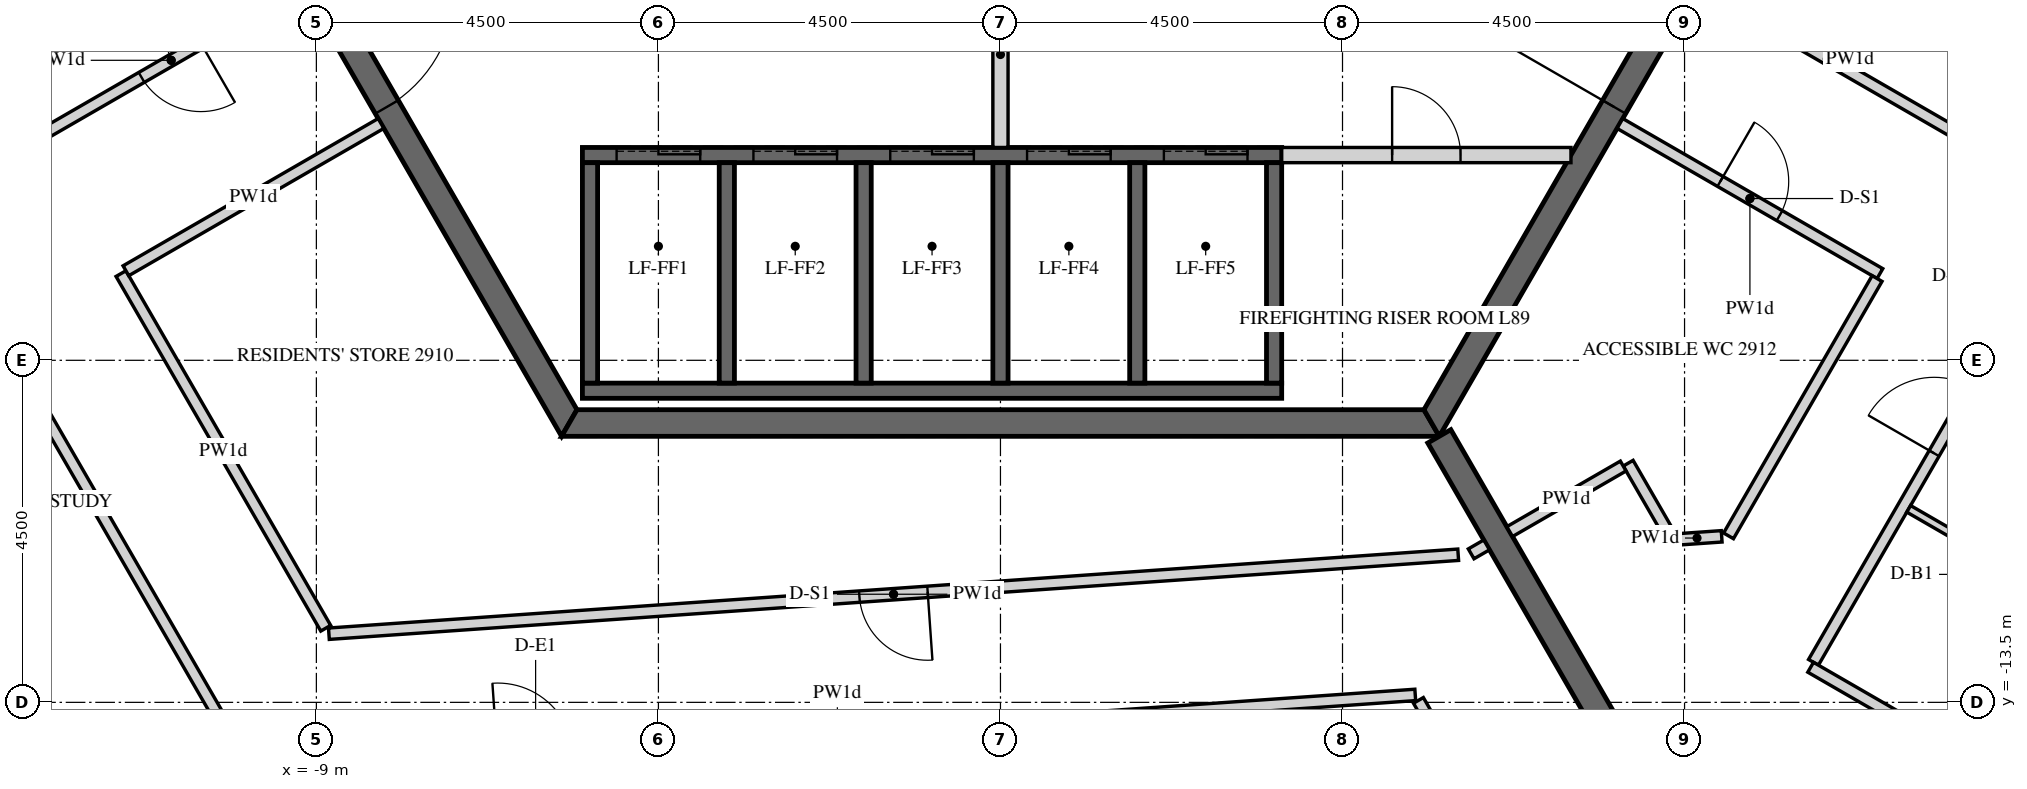
"""IFC4 building model, lengths in metres.
Left out: names, types, materials, properties, quantities, classifications, styles, units other than length and angle.
Written with IfcOpenShell. Run it as: python <this file> out.ifc"""

import sys

from ifc_helpers import new_model, si_unit, direction, frame, frame_2d, origin, place, context, subcontext, project, spatial, polyline, rectangle, outline, extrude, element, fill, save


model = new_model("IFC4")
c1 = context("Model", 3, precision=1e-05, world=origin(), true_north=direction((0.0, 1.0)))
c2 = subcontext(c1, "Body", "Model", "MODEL_VIEW")
j1 = project(units=[si_unit("LENGTHUNIT", "METRE"), si_unit("PLANEANGLEUNIT", "RADIAN")], contexts=[c1])
p1 = place(None, origin())
s1 = spatial("IfcSite", under=j1, at=p1, CompositionType="ELEMENT")
p2 = place(p1, origin())
s2 = spatial("IfcBuilding", under=s1, at=p2, CompositionType="ELEMENT")
p3 = place(p2, frame((0.0, 0.0, 369.0)))
s3 = spatial("IfcBuildingStorey", under=s2, at=p3, CompositionType="ELEMENT", Elevation=369.0)
p4 = place(p3, frame((-11.345, 0.0, -0.15), z_axis=(0.0, 0.0, 1.0), x_axis=(0.499995046907, -0.866028263435, 0.0)))
e1 = element("IfcWall", 1, at=p4, inside=s3, PredefinedType="SHEAR", context=c2, shape_type="SweptSolid", body=[
    extrude(outline(polyline([(-0.101, -0.175), (11.446, -0.175), (11.244, 0.175), (0.101, 0.175), (-0.101, -0.175)])), origin(), (0.0, 0.0, 1.0), 3.9),
])
p5 = place(p4, frame((4.744, 0.0, 0.15)))
e2 = element("IfcOpeningElement", 2, at=p5, cuts=e1, PredefinedType="OPENING", context=c2, shape_type="SweptSolid", body=[
    extrude(rectangle(XDim=1.8, YDim=2.4, at=frame_2d((0.9, 1.2))), frame((0.0, 0.185, 0.0), z_axis=(0.0, -1.0, 0.0), x_axis=(1.0, 0.0, 0.0)), (0.0, 0.0, 1.0), 0.37),
])
p6 = place(p3, frame((-5.673, -9.825, -0.15), z_axis=(0.0, 0.0, 1.0), x_axis=(1.0, 0.0, 0.0)))
e3 = element("IfcWall", 3, at=p6, inside=s3, PredefinedType="SHEAR", context=c2, shape_type="SweptSolid", body=[
    extrude(outline(polyline([(-0.101, -0.175), (11.446, -0.175), (11.244, 0.175), (0.101, 0.175), (-0.101, -0.175)])), origin(), (0.0, 0.0, 1.0), 3.9),
])
p7 = place(p3, frame((5.673, -9.825, -0.15), z_axis=(0.0, 0.0, 1.0), x_axis=(0.499995046907, 0.866028263435, 0.0)))
e4 = element("IfcWall", 4, at=p7, inside=s3, PredefinedType="SHEAR", context=c2, shape_type="SweptSolid", body=[
    extrude(outline(polyline([(-0.101, -0.175), (11.446, -0.175), (11.244, 0.175), (0.101, 0.175), (-0.101, -0.175)])), origin(), (0.0, 0.0, 1.0), 3.9),
])
p8 = place(p7, frame((4.801, 0.0, 0.15)))
e5 = element("IfcOpeningElement", 5, at=p8, cuts=e4, PredefinedType="OPENING", context=c2, shape_type="SweptSolid", body=[
    extrude(rectangle(XDim=1.8, YDim=2.4, at=frame_2d((0.9, 1.2))), frame((0.0, 0.185, 0.0), z_axis=(0.0, -1.0, 0.0), x_axis=(1.0, 0.0, 0.0)), (0.0, 0.0, 1.0), 0.37),
])
p9 = place(p3, frame((5.773, -10.0, -0.15), z_axis=(0.0, 0.0, 1.0), x_axis=(0.500007911273, -0.866020836161, 0.0)))
e6 = element("IfcWall", 6, at=p9, inside=s3, PredefinedType="SHEAR", context=c2, shape_type="SweptSolid", body=[
    extrude(rectangle(XDim=14.51, YDim=0.35, at=frame_2d((7.255, 0.0))), origin(), (0.0, 0.0, 1.0), 3.9),
])
p10 = place(p9, frame((6.355, 0.0, 0.15)))
e7 = element("IfcOpeningElement", 7, at=p10, cuts=e6, PredefinedType="OPENING", context=c2, shape_type="SweptSolid", body=[
    extrude(rectangle(XDim=1.8, YDim=2.4, at=frame_2d((0.9, 1.2))), frame((0.0, 0.185, 0.0), z_axis=(0.0, -1.0, 0.0), x_axis=(1.0, 0.0, 0.0)), (0.0, 0.0, 1.0), 0.37),
])
p11 = place(p3, frame((-5.5, -6.3, -0.25), z_axis=(0.0, 0.0, 1.0), x_axis=(1.0, 0.0, 0.0)))
e8 = element("IfcWall", 8, at=p11, inside=s3, PredefinedType="SHEAR", context=c2, shape_type="SweptSolid", body=[
    extrude(rectangle(XDim=9.2, YDim=0.2, at=frame_2d((4.6, 0.0))), origin(), (0.0, 0.0, 1.0), 3.9),
])
p12 = place(p11, frame((0.45, 0.0, 0.25)))
e9 = element("IfcOpeningElement", 9, at=p12, cuts=e8, PredefinedType="OPENING", context=c2, shape_type="SweptSolid", body=[
    extrude(rectangle(XDim=1.1, YDim=2.1, at=frame_2d((0.55, 1.05))), frame((0.0, 0.11, 0.0), z_axis=(0.0, -1.0, 0.0), x_axis=(1.0, 0.0, 0.0)), (0.0, 0.0, 1.0), 0.22),
])
p13 = place(p11, frame((2.25, 0.0, 0.25)))
e10 = element("IfcOpeningElement", 10, at=p13, cuts=e8, PredefinedType="OPENING", context=c2, shape_type="SweptSolid", body=[
    extrude(rectangle(XDim=1.1, YDim=2.1, at=frame_2d((0.55, 1.05))), frame((0.0, 0.11, 0.0), z_axis=(0.0, -1.0, 0.0), x_axis=(1.0, 0.0, 0.0)), (0.0, 0.0, 1.0), 0.22),
])
p14 = place(p11, frame((4.05, 0.0, 0.25)))
e11 = element("IfcOpeningElement", 11, at=p14, cuts=e8, PredefinedType="OPENING", context=c2, shape_type="SweptSolid", body=[
    extrude(rectangle(XDim=1.1, YDim=2.1, at=frame_2d((0.55, 1.05))), frame((0.0, 0.11, 0.0), z_axis=(0.0, -1.0, 0.0), x_axis=(1.0, 0.0, 0.0)), (0.0, 0.0, 1.0), 0.22),
])
p15 = place(p11, frame((5.85, 0.0, 0.25)))
e12 = element("IfcOpeningElement", 12, at=p15, cuts=e8, PredefinedType="OPENING", context=c2, shape_type="SweptSolid", body=[
    extrude(rectangle(XDim=1.1, YDim=2.1, at=frame_2d((0.55, 1.05))), frame((0.0, 0.11, 0.0), z_axis=(0.0, -1.0, 0.0), x_axis=(1.0, 0.0, 0.0)), (0.0, 0.0, 1.0), 0.22),
])
p16 = place(p11, frame((7.65, 0.0, 0.25)))
e13 = element("IfcOpeningElement", 13, at=p16, cuts=e8, PredefinedType="OPENING", context=c2, shape_type="SweptSolid", body=[
    extrude(rectangle(XDim=1.1, YDim=2.1, at=frame_2d((0.55, 1.05))), frame((0.0, 0.11, 0.0), z_axis=(0.0, -1.0, 0.0), x_axis=(1.0, 0.0, 0.0)), (0.0, 0.0, 1.0), 0.22),
])
p17 = place(p3, frame((-5.5, -9.4, -0.25), z_axis=(0.0, 0.0, 1.0), x_axis=(1.0, 0.0, 0.0)))
e14 = element("IfcWall", 14, at=p17, inside=s3, PredefinedType="SHEAR", context=c2, shape_type="SweptSolid", body=[
    extrude(rectangle(XDim=9.2, YDim=0.2, at=frame_2d((4.6, 0.0))), origin(), (0.0, 0.0, 1.0), 3.9),
])
for number, where, z_axis, x_axis in (
    (15, (-5.4, -9.3, -0.25), (0.0, 0.0, 1.0), (0.0, 1.0, 0.0)),
    (16, (-3.6, -9.3, -0.25), (0.0, 0.0, 1.0), (0.0, 1.0, 0.0)),
    (17, (-1.8, -9.3, -0.25), (0.0, 0.0, 1.0), (0.0, 1.0, 0.0)),
    (18, (0.0, -9.3, -0.25), (0.0, 0.0, 1.0), (0.0, 1.0, 0.0)),
    (19, (1.8, -9.3, -0.25), (0.0, 0.0, 1.0), (0.0, 1.0, 0.0)),
    (20, (3.6, -9.3, -0.25), (0.0, 0.0, 1.0), (0.0, 1.0, 0.0)),
):
    element("IfcWall", number, at=place(p3, frame(where, z_axis=z_axis, x_axis=x_axis)), inside=s3, PredefinedType="SHEAR", context=c2, shape_type="SweptSolid", body=[
        extrude(rectangle(XDim=2.9, YDim=0.2, at=frame_2d((1.45, 0.0))), origin(), (0.0, 0.0, 1.0), 3.9),
    ])
p18 = place(p3, frame((0.0, -6.2, 0.0), z_axis=(0.0, 0.0, 1.0), x_axis=(0.0, 1.0, 0.0)))
e21 = element("IfcWall", 21, at=p18, inside=s3, PredefinedType="PARTITIONING", context=c2, shape_type="SweptSolid", body=[
    extrude(rectangle(XDim=6.1, YDim=0.2, at=frame_2d((3.05, 0.0))), origin(), (0.0, 0.0, 1.0), 3.65),
])
p19 = place(p3, frame((3.7, -6.3, 0.0), z_axis=(0.0, 0.0, 1.0), x_axis=(1.0, 0.0, 0.0)))
e22 = element("IfcWall", 22, at=p19, inside=s3, PredefinedType="PARTITIONING", context=c2, shape_type="SweptSolid", body=[
    extrude(rectangle(XDim=3.806, YDim=0.2, at=frame_2d((1.903, 0.0))), origin(), (0.0, 0.0, 1.0), 3.65),
])
p20 = place(p19, frame((1.453, 0.0, 0.0)))
e23 = element("IfcOpeningElement", 23, at=p20, cuts=e22, PredefinedType="OPENING", context=c2, shape_type="SweptSolid", body=[
    extrude(rectangle(XDim=0.9, YDim=2.1, at=frame_2d((0.45, 1.05))), frame((0.0, 0.11, 0.0), z_axis=(0.0, -1.0, 0.0), x_axis=(1.0, 0.0, 0.0)), (0.0, 0.0, 1.0), 0.22),
])
p21 = place(p3, frame((-16.583, -2.777, 0.0), z_axis=(0.0, 0.0, 1.0), x_axis=(0.50000467473, -0.866022704811, 0.0)))
e24 = element("IfcWall", 24, at=p21, inside=s3, PredefinedType="PARTITIONING", context=c2, shape_type="SweptSolid", body=[
    extrude(rectangle(XDim=13.504, YDim=0.15, at=frame_2d((6.752, 0.0))), origin(), (0.0, 0.0, 1.0), 2.47),
])
p22 = place(p21, frame((0.925, 0.0, 0.0)))
e25 = element("IfcOpeningElement", 25, at=p22, cuts=e24, PredefinedType="OPENING", context=c2, shape_type="SweptSolid", body=[
    extrude(rectangle(XDim=1.0, YDim=2.1, at=frame_2d((0.5, 1.05))), frame((0.0, 0.085, 0.0), z_axis=(0.0, -1.0, 0.0), x_axis=(1.0, 0.0, 0.0)), (0.0, 0.0, 1.0), 0.17),
])
p23 = place(p3, frame((-9.749, -14.465, 0.0), z_axis=(0.0, 0.0, 1.0), x_axis=(0.997564252773, 0.069753577612, 0.0)))
e26 = element("IfcWall", 26, at=p23, inside=s3, PredefinedType="PARTITIONING", context=c2, shape_type="SweptSolid", body=[
    extrude(rectangle(XDim=15.243, YDim=0.15, at=frame_2d((7.621, 0.0))), origin(), (0.0, 0.0, 1.0), 2.47),
])
p24 = place(p23, frame((3.142, 0.0, 0.0)))
e27 = element("IfcOpeningElement", 27, at=p24, cuts=e26, PredefinedType="OPENING", context=c2, shape_type="SweptSolid", body=[
    extrude(rectangle(XDim=1.0, YDim=2.1, at=frame_2d((0.5, 1.05))), frame((0.0, 0.085, 0.0), z_axis=(0.0, -1.0, 0.0), x_axis=(1.0, 0.0, 0.0)), (0.0, 0.0, 1.0), 0.17),
])
p25 = place(p3, frame((5.499, -13.474, 0.0), z_axis=(0.0, 0.0, 1.0), x_axis=(0.500002592159, -0.866023907196, 0.0)))
e28 = element("IfcWall", 28, at=p25, inside=s3, PredefinedType="PARTITIONING", context=c2, shape_type="SweptSolid", body=[
    extrude(rectangle(XDim=5.784, YDim=0.15, at=frame_2d((2.892, 0.0))), origin(), (0.0, 0.0, 1.0), 2.47),
])
p26 = place(p3, frame((-9.2, -4.066, 0.0), z_axis=(0.0, 0.0, 1.0), x_axis=(-0.866020906874, -0.500007788796, 0.0)))
e29 = element("IfcWall", 29, at=p26, inside=s3, PredefinedType="PARTITIONING", context=c2, shape_type="SweptSolid", body=[
    extrude(rectangle(XDim=3.95, YDim=0.15, at=frame_2d((1.975, 0.0))), origin(), (0.0, 0.0, 1.0), 2.47),
])
p27 = place(p26, frame((1.525, 0.0, 0.0)))
e30 = element("IfcOpeningElement", 30, at=p27, cuts=e29, PredefinedType="OPENING", context=c2, shape_type="SweptSolid", body=[
    extrude(rectangle(XDim=0.9, YDim=2.1, at=frame_2d((0.45, 1.05))), frame((0.0, 0.085, 0.0), z_axis=(0.0, -1.0, 0.0), x_axis=(1.0, 0.0, 0.0)), (0.0, 0.0, 1.0), 0.17),
])
p28 = place(p3, frame((6.396, -11.429, 0.0), z_axis=(0.0, 0.0, 1.0), x_axis=(-0.866254745882, -0.499602557277, 0.0)))
e31 = element("IfcWall", 31, at=p28, inside=s3, PredefinedType="PARTITIONING", context=c2, shape_type="SweptSolid", body=[
    extrude(rectangle(XDim=0.235, YDim=0.15, at=frame_2d((0.118, 0.0))), origin(), (0.0, 0.0, 1.0), 2.47),
])
p29 = place(p3, frame((6.022, -11.558, 0.0), z_axis=(0.0, 0.0, 1.0), x_axis=(-0.997564502115, -0.06975001161, 0.0)))
e32 = element("IfcWall", 32, at=p29, inside=s3, PredefinedType="PARTITIONING", context=c2, shape_type="SweptSolid", body=[
    extrude(rectangle(XDim=14.894, YDim=0.15, at=frame_2d((7.447, 0.0))), origin(), (0.0, 0.0, 1.0), 2.47),
])
p30 = place(p29, frame((6.997, 0.0, 0.0)))
e33 = element("IfcOpeningElement", 33, at=p30, cuts=e32, PredefinedType="OPENING", context=c2, shape_type="SweptSolid", body=[
    extrude(rectangle(XDim=0.9, YDim=2.1, at=frame_2d((0.45, 1.05))), frame((0.0, 0.085, 0.0), z_axis=(0.0, -1.0, 0.0), x_axis=(1.0, 0.0, 0.0)), (0.0, 0.0, 1.0), 0.17),
])
p31 = place(p3, frame((-8.877, -12.525, 0.0), z_axis=(0.0, 0.0, 1.0), x_axis=(-0.500014061761, 0.866017285071, 0.0)))
e34 = element("IfcWall", 34, at=p31, inside=s3, PredefinedType="PARTITIONING", context=c2, shape_type="SweptSolid", body=[
    extrude(rectangle(XDim=5.387, YDim=0.15, at=frame_2d((2.693, 0.0))), origin(), (0.0, 0.0, 1.0), 2.47),
])
p32 = place(p3, frame((-11.506, -7.822, 0.0), z_axis=(0.0, 0.0, 1.0), x_axis=(0.866032409438, 0.499987865656, 0.0)))
e35 = element("IfcWall", 35, at=p32, inside=s3, PredefinedType="PARTITIONING", context=c2, shape_type="SweptSolid", body=[
    extrude(rectangle(XDim=3.875, YDim=0.15, at=frame_2d((1.938, 0.0))), origin(), (0.0, 0.0, 1.0), 2.47),
])
p33 = place(p3, frame((10.697, -12.973, 0.0), z_axis=(0.0, 0.0, 1.0), x_axis=(0.499991115059, 0.866030533446, 0.0)))
e36 = element("IfcWall", 36, at=p33, inside=s3, PredefinedType="PARTITIONING", context=c2, shape_type="SweptSolid", body=[
    extrude(rectangle(XDim=13.504, YDim=0.15, at=frame_2d((6.752, 0.0))), origin(), (0.0, 0.0, 1.0), 2.47),
])
p34 = place(p33, frame((3.175, 0.0, 0.0)))
e37 = element("IfcOpeningElement", 37, at=p34, cuts=e36, PredefinedType="OPENING", context=c2, shape_type="SweptSolid", body=[
    extrude(rectangle(XDim=1.0, YDim=2.1, at=frame_2d((0.5, 1.05))), frame((0.0, 0.085, 0.0), z_axis=(0.0, -1.0, 0.0), x_axis=(1.0, 0.0, 0.0)), (0.0, 0.0, 1.0), 0.17),
])
p35 = place(p3, frame((13.777, -14.838, 0.0), z_axis=(0.0, 0.0, 1.0), x_axis=(-0.866047807691, 0.499961193289, 0.0)))
e38 = element("IfcWall", 38, at=p35, inside=s3, PredefinedType="PARTITIONING", context=c2, shape_type="SweptSolid", body=[
    extrude(rectangle(XDim=3.6, YDim=0.15, at=frame_2d((1.8, 0.0))), origin(), (0.0, 0.0, 1.0), 2.47),
])
p36 = place(p3, frame((12.555, -6.003, 0.0), z_axis=(0.0, 0.0, 1.0), x_axis=(-0.866016658288, 0.500015147339, 0.0)))
e39 = element("IfcWall", 39, at=p36, inside=s3, PredefinedType="PARTITIONING", context=c2, shape_type="SweptSolid", body=[
    extrude(rectangle(XDim=3.875, YDim=0.15, at=frame_2d((1.938, 0.0))), origin(), (0.0, 0.0, 1.0), 2.47),
])
p37 = place(p3, frame((8.15, -5.884, 0.0), z_axis=(0.0, 0.0, 1.0), x_axis=(0.866020906874, -0.500007788796, 0.0)))
e40 = element("IfcWall", 40, at=p37, inside=s3, PredefinedType="PARTITIONING", context=c2, shape_type="SweptSolid", body=[
    extrude(rectangle(XDim=3.95, YDim=0.15, at=frame_2d((1.975, 0.0))), origin(), (0.0, 0.0, 1.0), 2.47),
])
p38 = place(p37, frame((1.525, 0.0, 0.0)))
e41 = element("IfcOpeningElement", 41, at=p38, cuts=e40, PredefinedType="OPENING", context=c2, shape_type="SweptSolid", body=[
    extrude(rectangle(XDim=0.9, YDim=2.1, at=frame_2d((0.45, 1.05))), frame((0.0, 0.085, 0.0), z_axis=(0.0, -1.0, 0.0), x_axis=(1.0, 0.0, 0.0)), (0.0, 0.0, 1.0), 0.17),
])
p39 = place(p3, frame((11.533, -7.924, 0.0), z_axis=(0.0, 0.0, 1.0), x_axis=(-0.500001804394, -0.866024362014, 0.0)))
e42 = element("IfcWall", 42, at=p39, inside=s3, PredefinedType="PARTITIONING", context=c2, shape_type="SweptSolid", body=[
    extrude(rectangle(XDim=3.909, YDim=0.15, at=frame_2d((1.954, 0.0))), origin(), (0.0, 0.0, 1.0), 2.47),
])
p40 = place(p3, frame((9.488, -11.316, 0.0), z_axis=(0.0, 0.0, 1.0), x_axis=(-0.997556873667, -0.06985902805, 0.0)))
e43 = element("IfcWall", 43, at=p40, inside=s3, PredefinedType="PARTITIONING", context=c2, shape_type="SweptSolid", body=[
    extrude(rectangle(XDim=0.65, YDim=0.15, at=frame_2d((0.325, 0.0))), origin(), (0.0, 0.0, 1.0), 2.47),
])
p41 = place(p3, frame((8.798, -11.289, 0.0), z_axis=(0.0, 0.0, 1.0), x_axis=(-0.499859449273, 0.866106535579, 0.0)))
e44 = element("IfcWall", 44, at=p41, inside=s3, PredefinedType="PARTITIONING", context=c2, shape_type="SweptSolid", body=[
    extrude(rectangle(XDim=1.08, YDim=0.15, at=frame_2d((0.54, 0.0))), origin(), (0.0, 0.0, 1.0), 2.47),
])
p42 = place(p3, frame((8.193, -10.391, 0.0), z_axis=(0.0, 0.0, 1.0), x_axis=(-0.866013532718, -0.500020560727, 0.0)))
e45 = element("IfcWall", 45, at=p42, inside=s3, PredefinedType="PARTITIONING", context=c2, shape_type="SweptSolid", body=[
    extrude(rectangle(XDim=1.725, YDim=0.15, at=frame_2d((0.863, 0.0))), origin(), (0.0, 0.0, 1.0), 2.47),
])
p43 = place(p3, frame((11.949, -10.954, 0.0), z_axis=(0.0, 0.0, 1.0), x_axis=(0.866001044215, -0.500042189638, 0.0)))
e46 = element("IfcWall", 46, at=p43, inside=s3, PredefinedType="PARTITIONING", context=c2, shape_type="SweptSolid", body=[
    extrude(rectangle(XDim=3.525, YDim=0.1, at=frame_2d((1.763, 0.0))), origin(), (0.0, 0.0, 1.0), 2.47),
])
p44 = place(p43, frame((1.325, 0.0, 0.0)))
e47 = element("IfcOpeningElement", 47, at=p44, cuts=e46, PredefinedType="OPENING", context=c2, shape_type="SweptSolid", body=[
    extrude(rectangle(XDim=0.8, YDim=2.1, at=frame_2d((0.4, 1.05))), frame((0.0, 0.06, 0.0), z_axis=(0.0, -1.0, 0.0), x_axis=(1.0, 0.0, 0.0)), (0.0, 0.0, 1.0), 0.12),
])
p45 = place(p5, origin())
e48 = element("IfcDoor", 48, at=p45, inside=s3, OperationType="DOUBLE_DOOR_SINGLE_SWING", PredefinedType="DOOR", context=c2, shape_type="SweptSolid", body=[
    extrude(rectangle(XDim=1.8, YDim=2.4, at=frame_2d((0.9, 1.2))), frame((0.0, 0.025, 0.0), z_axis=(0.0, -1.0, 0.0), x_axis=(1.0, 0.0, 0.0)), (0.0, 0.0, 1.0), 0.05),
])
fill(e2, e48)
p46 = place(p8, origin())
e49 = element("IfcDoor", 49, at=p46, inside=s3, OperationType="DOUBLE_DOOR_SINGLE_SWING", PredefinedType="DOOR", context=c2, shape_type="SweptSolid", body=[
    extrude(rectangle(XDim=1.8, YDim=2.4, at=frame_2d((0.9, 1.2))), frame((0.0, 0.025, 0.0), z_axis=(0.0, -1.0, 0.0), x_axis=(1.0, 0.0, 0.0)), (0.0, 0.0, 1.0), 0.05),
])
fill(e5, e49)
p47 = place(p20, origin())
e50 = element("IfcDoor", 50, at=p47, inside=s3, OperationType="SINGLE_SWING_LEFT", PredefinedType="DOOR", context=c2, shape_type="SweptSolid", body=[
    extrude(rectangle(XDim=0.9, YDim=2.1, at=frame_2d((0.45, 1.05))), frame((0.0, 0.025, 0.0), z_axis=(0.0, -1.0, 0.0), x_axis=(1.0, 0.0, 0.0)), (0.0, 0.0, 1.0), 0.05),
])
fill(e23, e50)
p48 = place(p12, origin())
e51 = element("IfcDoor", 51, at=p48, inside=s3, OperationType="SLIDING_TO_LEFT", PredefinedType="DOOR", context=c2, shape_type="SweptSolid", body=[
    extrude(rectangle(XDim=1.1, YDim=2.1, at=frame_2d((0.55, 1.05))), frame((0.0, 0.025, 0.0), z_axis=(0.0, -1.0, 0.0), x_axis=(1.0, 0.0, 0.0)), (0.0, 0.0, 1.0), 0.05),
])
fill(e9, e51)
p49 = place(p13, origin())
e52 = element("IfcDoor", 52, at=p49, inside=s3, OperationType="SLIDING_TO_LEFT", PredefinedType="DOOR", context=c2, shape_type="SweptSolid", body=[
    extrude(rectangle(XDim=1.1, YDim=2.1, at=frame_2d((0.55, 1.05))), frame((0.0, 0.025, 0.0), z_axis=(0.0, -1.0, 0.0), x_axis=(1.0, 0.0, 0.0)), (0.0, 0.0, 1.0), 0.05),
])
fill(e10, e52)
p50 = place(p14, origin())
e53 = element("IfcDoor", 53, at=p50, inside=s3, OperationType="SLIDING_TO_LEFT", PredefinedType="DOOR", context=c2, shape_type="SweptSolid", body=[
    extrude(rectangle(XDim=1.1, YDim=2.1, at=frame_2d((0.55, 1.05))), frame((0.0, 0.025, 0.0), z_axis=(0.0, -1.0, 0.0), x_axis=(1.0, 0.0, 0.0)), (0.0, 0.0, 1.0), 0.05),
])
fill(e11, e53)
p51 = place(p15, origin())
e54 = element("IfcDoor", 54, at=p51, inside=s3, OperationType="SLIDING_TO_LEFT", PredefinedType="DOOR", context=c2, shape_type="SweptSolid", body=[
    extrude(rectangle(XDim=1.1, YDim=2.1, at=frame_2d((0.55, 1.05))), frame((0.0, 0.025, 0.0), z_axis=(0.0, -1.0, 0.0), x_axis=(1.0, 0.0, 0.0)), (0.0, 0.0, 1.0), 0.05),
])
fill(e12, e54)
p52 = place(p16, origin())
e55 = element("IfcDoor", 55, at=p52, inside=s3, OperationType="SLIDING_TO_LEFT", PredefinedType="DOOR", context=c2, shape_type="SweptSolid", body=[
    extrude(rectangle(XDim=1.1, YDim=2.1, at=frame_2d((0.55, 1.05))), frame((0.0, 0.025, 0.0), z_axis=(0.0, -1.0, 0.0), x_axis=(1.0, 0.0, 0.0)), (0.0, 0.0, 1.0), 0.05),
])
fill(e13, e55)
p53 = place(p34, origin())
e56 = element("IfcDoor", 56, at=p53, inside=s3, OperationType="SINGLE_SWING_LEFT", PredefinedType="DOOR", context=c2, shape_type="SweptSolid", body=[
    extrude(rectangle(XDim=1.0, YDim=2.1, at=frame_2d((0.5, 1.05))), frame((0.0, 0.025, 0.0), z_axis=(0.0, -1.0, 0.0), x_axis=(1.0, 0.0, 0.0)), (0.0, 0.0, 1.0), 0.05),
])
fill(e37, e56)
p54 = place(p27, origin())
e57 = element("IfcDoor", 57, at=p54, inside=s3, OperationType="SINGLE_SWING_LEFT", PredefinedType="DOOR", context=c2, shape_type="SweptSolid", body=[
    extrude(rectangle(XDim=0.9, YDim=2.1, at=frame_2d((0.45, 1.05))), frame((0.0, 0.025, 0.0), z_axis=(0.0, -1.0, 0.0), x_axis=(1.0, 0.0, 0.0)), (0.0, 0.0, 1.0), 0.05),
])
fill(e30, e57)
p55 = place(p30, origin())
e58 = element("IfcDoor", 58, at=p55, inside=s3, OperationType="SINGLE_SWING_RIGHT", PredefinedType="DOOR", context=c2, shape_type="SweptSolid", body=[
    extrude(rectangle(XDim=0.9, YDim=2.1, at=frame_2d((0.45, 1.05))), frame((0.0, 0.025, 0.0), z_axis=(0.0, -1.0, 0.0), x_axis=(1.0, 0.0, 0.0)), (0.0, 0.0, 1.0), 0.05),
])
fill(e33, e58)
p56 = place(p38, origin())
e59 = element("IfcDoor", 59, at=p56, inside=s3, OperationType="SINGLE_SWING_LEFT", PredefinedType="DOOR", context=c2, shape_type="SweptSolid", body=[
    extrude(rectangle(XDim=0.9, YDim=2.1, at=frame_2d((0.45, 1.05))), frame((0.0, 0.025, 0.0), z_axis=(0.0, -1.0, 0.0), x_axis=(1.0, 0.0, 0.0)), (0.0, 0.0, 1.0), 0.05),
])
fill(e41, e59)
save(model, sys.argv[1])
